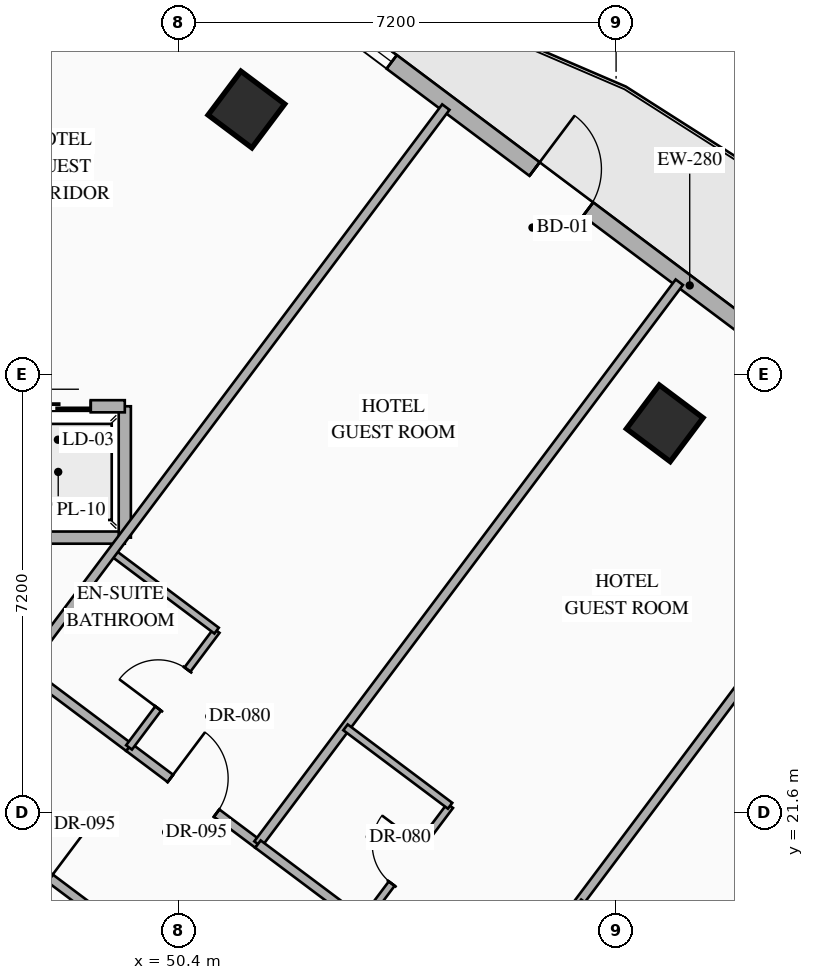
"""IFC4 building model, lengths in metres.
Left out: names, types, materials, properties, quantities, classifications, styles, units other than length and angle.
Written with IfcOpenShell. Run it as: python <this file> out.ifc"""

import sys

from ifc_helpers import new_model, si_unit, direction, frame, frame_2d, origin, origin_2d, place, context, subcontext, project, spatial, rectangle, hollow_rectangle, extrude, element, fill, save


model = new_model("IFC4")
c1 = context("Model", 3, precision=1e-05, world=origin(), true_north=direction((0.0, 1.0)))
c2 = subcontext(c1, "Body", "Model", "MODEL_VIEW")
j1 = project(units=[si_unit("LENGTHUNIT", "METRE"), si_unit("PLANEANGLEUNIT", "RADIAN")], contexts=[c1])
p1 = place(None, origin())
s1 = spatial("IfcSite", under=j1, at=p1, CompositionType="ELEMENT")
p2 = place(p1, origin())
s2 = spatial("IfcBuilding", under=s1, at=p2, CompositionType="ELEMENT")
p3 = place(p2, frame((0.0, 0.0, 88.0)))
s3 = spatial("IfcBuildingStorey", under=s2, at=p3, CompositionType="ELEMENT", Elevation=88.0)
for number, where, z_axis, x_axis in (
    (1, (51.52, 33.16, 0.0), (0.0, 0.0, 1.0), (0.8, -0.6, 0.0)),
    (2, (58.4, 28.0, 0.0), (0.0, 0.0, 1.0), (0.8, -0.6, 0.0)),
):
    element("IfcColumn", number, at=place(p3, frame(where, z_axis=z_axis, x_axis=x_axis)), inside=s3, PredefinedType="COLUMN", context=c2, shape_type="SweptSolid", body=[
        extrude(hollow_rectangle(XDim=0.9, YDim=0.9, WallThickness=0.036, at=origin_2d()), origin(), (0.0, 0.0, 1.0), 3.35),
    ])
p4 = place(p3, frame((44.86, 40.73, 0.0), z_axis=(0.0, 0.0, 1.0), x_axis=(0.800006902154, -0.599990797017, 0.0)))
e3 = element("IfcWall", 3, at=p4, inside=s3, PredefinedType="STANDARD", context=c2, shape_type="SweptSolid", body=[
    extrude(rectangle(XDim=29.712, YDim=0.28, at=frame_2d((14.856, 0.0))), origin(), (0.0, 0.0, 1.0), 3.05),
])
p5 = place(p4, frame((14.249, 0.0, 0.0)))
e4 = element("IfcOpeningElement", 4, at=p5, cuts=e3, PredefinedType="OPENING", context=c2, shape_type="SweptSolid", body=[
    extrude(rectangle(XDim=1.1, YDim=2.2, at=frame_2d((0.55, 1.1))), frame((0.0, 0.15, 0.0), z_axis=(0.0, -1.0, 0.0), x_axis=(1.0, 0.0, 0.0)), (0.0, 0.0, 1.0), 0.3),
])
p6 = place(p4, frame((1.612, 0.0, 0.85)))
e5 = element("IfcOpeningElement", 5, at=p6, cuts=e3, PredefinedType="OPENING", context=c2, shape_type="SweptSolid", body=[
    extrude(rectangle(XDim=1.4, YDim=1.8, at=frame_2d((0.7, 0.9))), frame((0.0, 0.15, 0.0), z_axis=(0.0, -1.0, 0.0), x_axis=(1.0, 0.0, 0.0)), (0.0, 0.0, 1.0), 0.3),
])
p7 = place(p4, frame((5.667, 0.0, 0.85)))
e6 = element("IfcOpeningElement", 6, at=p7, cuts=e3, PredefinedType="OPENING", context=c2, shape_type="SweptSolid", body=[
    extrude(rectangle(XDim=1.4, YDim=1.8, at=frame_2d((0.7, 0.9))), frame((0.0, 0.15, 0.0), z_axis=(0.0, -1.0, 0.0), x_axis=(1.0, 0.0, 0.0)), (0.0, 0.0, 1.0), 0.3),
])
p8 = place(p4, frame((9.912, 0.0, 0.85)))
e7 = element("IfcOpeningElement", 7, at=p8, cuts=e3, PredefinedType="OPENING", context=c2, shape_type="SweptSolid", body=[
    extrude(rectangle(XDim=1.4, YDim=1.8, at=frame_2d((0.7, 0.9))), frame((0.0, 0.15, 0.0), z_axis=(0.0, -1.0, 0.0), x_axis=(1.0, 0.0, 0.0)), (0.0, 0.0, 1.0), 0.3),
])
p9 = place(p4, frame((19.528, 0.0, 0.85)))
e8 = element("IfcOpeningElement", 8, at=p9, cuts=e3, PredefinedType="OPENING", context=c2, shape_type="SweptSolid", body=[
    extrude(rectangle(XDim=1.4, YDim=1.8, at=frame_2d((0.7, 0.9))), frame((0.0, 0.15, 0.0), z_axis=(0.0, -1.0, 0.0), x_axis=(1.0, 0.0, 0.0)), (0.0, 0.0, 1.0), 0.3),
])
p10 = place(p4, frame((23.451, 0.0, 0.85)))
e9 = element("IfcOpeningElement", 9, at=p10, cuts=e3, PredefinedType="OPENING", context=c2, shape_type="SweptSolid", body=[
    extrude(rectangle(XDim=1.4, YDim=1.8, at=frame_2d((0.7, 0.9))), frame((0.0, 0.15, 0.0), z_axis=(0.0, -1.0, 0.0), x_axis=(1.0, 0.0, 0.0)), (0.0, 0.0, 1.0), 0.3),
])
p11 = place(p4, frame((27.852, 0.0, 0.85)))
e10 = element("IfcOpeningElement", 10, at=p11, cuts=e3, PredefinedType="OPENING", context=c2, shape_type="SweptSolid", body=[
    extrude(rectangle(XDim=1.4, YDim=1.8, at=frame_2d((0.7, 0.9))), frame((0.0, 0.15, 0.0), z_axis=(0.0, -1.0, 0.0), x_axis=(1.0, 0.0, 0.0)), (0.0, 0.0, 1.0), 0.3),
])
p12 = place(p3, frame((45.12, 26.12, 0.0), z_axis=(0.0, 0.0, 1.0), x_axis=(1.0, 0.0, 0.0)))
e11 = element("IfcWall", 11, at=p12, inside=s3, PredefinedType="STANDARD", context=c2, shape_type="SweptSolid", body=[
    extrude(rectangle(XDim=4.4, YDim=0.2, at=frame_2d((2.2, 0.0))), origin(), (0.0, 0.0, 1.0), 3.05),
])
p13 = place(p3, frame((49.52, 26.12, 0.0), z_axis=(0.0, 0.0, 1.0), x_axis=(0.0, 1.0, 0.0)))
e12 = element("IfcWall", 12, at=p13, inside=s3, PredefinedType="STANDARD", context=c2, shape_type="SweptSolid", body=[
    extrude(rectangle(XDim=2.16, YDim=0.2, at=frame_2d((1.08, 0.0))), origin(), (0.0, 0.0, 1.0), 3.05),
])
p14 = place(p3, frame((45.12, 28.28, 0.0), z_axis=(0.0, 0.0, 1.0), x_axis=(1.0, 0.0, 0.0)))
e13 = element("IfcWall", 13, at=p14, inside=s3, PredefinedType="STANDARD", context=c2, shape_type="SweptSolid", body=[
    extrude(rectangle(XDim=4.4, YDim=0.2, at=frame_2d((2.2, 0.0))), origin(), (0.0, 0.0, 1.0), 3.05),
])
p15 = place(p14, frame((0.56, 0.0, 0.0)))
e14 = element("IfcOpeningElement", 14, at=p15, cuts=e13, PredefinedType="OPENING", context=c2, shape_type="SweptSolid", body=[
    extrude(rectangle(XDim=1.08, YDim=2.15, at=frame_2d((0.54, 1.075))), frame((0.0, 0.11, 0.0), z_axis=(0.0, -1.0, 0.0), x_axis=(1.0, 0.0, 0.0)), (0.0, 0.0, 1.0), 0.22),
])
p16 = place(p14, frame((2.76, 0.0, 0.0)))
e15 = element("IfcOpeningElement", 15, at=p16, cuts=e13, PredefinedType="OPENING", context=c2, shape_type="SweptSolid", body=[
    extrude(rectangle(XDim=1.08, YDim=2.15, at=frame_2d((0.54, 1.075))), frame((0.0, 0.11, 0.0), z_axis=(0.0, -1.0, 0.0), x_axis=(1.0, 0.0, 0.0)), (0.0, 0.0, 1.0), 0.22),
])
p17 = place(p3, frame((47.87, 23.96, 0.0), z_axis=(0.0, 0.0, 1.0), x_axis=(0.79998637334, -0.60001816845, 0.0)))
e16 = element("IfcWall", 16, at=p17, inside=s3, PredefinedType="PARTITIONING", context=c2, shape_type="SweptSolid", body=[
    extrude(rectangle(XDim=2.15, YDim=0.15, at=frame_2d((1.075, 0.0))), origin(), (0.0, 0.0, 1.0), 2.695),
])
p18 = place(p3, frame((49.59, 22.67, 0.0), z_axis=(0.0, 0.0, 1.0), x_axis=(0.800011056104, -0.599985258246, 0.0)))
e17 = element("IfcWall", 17, at=p18, inside=s3, PredefinedType="PARTITIONING", context=c2, shape_type="SweptSolid", body=[
    extrude(rectangle(XDim=2.65, YDim=0.15, at=frame_2d((1.325, 0.0))), origin(), (0.0, 0.0, 1.0), 2.695),
])
p19 = place(p18, frame((0.85, 0.0, 0.0)))
e18 = element("IfcOpeningElement", 18, at=p19, cuts=e17, PredefinedType="OPENING", context=c2, shape_type="SweptSolid", body=[
    extrude(rectangle(XDim=0.95, YDim=2.15, at=frame_2d((0.475, 1.075))), frame((0.0, 0.085, 0.0), z_axis=(0.0, -1.0, 0.0), x_axis=(1.0, 0.0, 0.0)), (0.0, 0.0, 1.0), 0.17),
])
p20 = place(p3, frame((49.59, 22.67, 0.0), z_axis=(0.0, 0.0, 1.0), x_axis=(0.599951172744, 0.800036618114, 0.0)))
e19 = element("IfcWall", 19, at=p20, inside=s3, PredefinedType="PARTITIONING", context=c2, shape_type="SweptSolid", body=[
    extrude(rectangle(XDim=2.4, YDim=0.12, at=frame_2d((1.2, 0.0))), origin(), (0.0, 0.0, 1.0), 3.05),
])
p21 = place(p20, frame((0.8, 0.0, 0.0)))
e20 = element("IfcOpeningElement", 20, at=p21, cuts=e19, PredefinedType="OPENING", context=c2, shape_type="SweptSolid", body=[
    extrude(rectangle(XDim=0.8, YDim=2.06, at=frame_2d((0.4, 1.03))), frame((0.0, 0.07, 0.0), z_axis=(0.0, -1.0, 0.0), x_axis=(1.0, 0.0, 0.0)), (0.0, 0.0, 1.0), 0.14),
])
p22 = place(p3, frame((49.31, 25.88, 0.0), z_axis=(0.0, 0.0, 1.0), x_axis=(0.800040880289, -0.59994548908, 0.0)))
e21 = element("IfcWall", 21, at=p22, inside=s3, PredefinedType="PARTITIONING", context=c2, shape_type="SweptSolid", body=[
    extrude(rectangle(XDim=2.15, YDim=0.12, at=frame_2d((1.075, 0.0))), origin(), (0.0, 0.0, 1.0), 3.05),
])
for number, where, z_axis, x_axis in (
    (22, (47.87, 23.96, 0.0), (0.0, 0.0, 1.0), (0.6, 0.8, 0.0)),
    (23, (51.71, 21.08, 0.0), (0.0, 0.0, 1.0), (0.6, 0.8, 0.0)),
):
    element("IfcWall", number, at=place(p3, frame(where, z_axis=z_axis, x_axis=x_axis)), inside=s3, PredefinedType="PARTITIONING", context=c2, shape_type="SweptSolid", body=[
        extrude(rectangle(XDim=11.55, YDim=0.15, at=frame_2d((5.775, 0.0))), origin(), (0.0, 0.0, 1.0), 3.05),
    ])
p23 = place(p3, frame((51.71, 21.08, 0.0), z_axis=(0.0, 0.0, 1.0), x_axis=(0.79998637334, -0.60001816845, 0.0)))
e24 = element("IfcWall", 24, at=p23, inside=s3, PredefinedType="PARTITIONING", context=c2, shape_type="SweptSolid", body=[
    extrude(rectangle(XDim=2.15, YDim=0.15, at=frame_2d((1.075, 0.0))), origin(), (0.0, 0.0, 1.0), 2.695),
])
p24 = place(p3, frame((53.43, 19.79, 0.0), z_axis=(0.0, 0.0, 1.0), x_axis=(0.600065100855, 0.79995117022, 0.0)))
e25 = element("IfcWall", 25, at=p24, inside=s3, PredefinedType="PARTITIONING", context=c2, shape_type="SweptSolid", body=[
    extrude(rectangle(XDim=2.4, YDim=0.12, at=frame_2d((1.2, 0.0))), origin(), (0.0, 0.0, 1.0), 3.05),
])
p25 = place(p24, frame((0.8, 0.0, 0.0)))
e26 = element("IfcOpeningElement", 26, at=p25, cuts=e25, PredefinedType="OPENING", context=c2, shape_type="SweptSolid", body=[
    extrude(rectangle(XDim=0.8, YDim=2.06, at=frame_2d((0.4, 1.03))), frame((0.0, 0.07, 0.0), z_axis=(0.0, -1.0, 0.0), x_axis=(1.0, 0.0, 0.0)), (0.0, 0.0, 1.0), 0.14),
])
p26 = place(p3, frame((53.15, 23.0, 0.0), z_axis=(0.0, 0.0, 1.0), x_axis=(0.800027249606, -0.599963665473, 0.0)))
e27 = element("IfcWall", 27, at=p26, inside=s3, PredefinedType="PARTITIONING", context=c2, shape_type="SweptSolid", body=[
    extrude(rectangle(XDim=2.15, YDim=0.12, at=frame_2d((1.075, 0.0))), origin(), (0.0, 0.0, 1.0), 3.05),
])
p27 = place(p3, frame((55.55, 18.2, 0.0), z_axis=(0.0, 0.0, 1.0), x_axis=(0.599996617946, 0.80000253653, 0.0)))
e28 = element("IfcWall", 28, at=p27, inside=s3, PredefinedType="PARTITIONING", context=c2, shape_type="SweptSolid", body=[
    extrude(rectangle(XDim=11.55, YDim=0.15, at=frame_2d((5.775, 0.0))), origin(), (0.0, 0.0, 1.0), 3.05),
])
p28 = place(p3, frame((56.99, 20.12, 0.0), z_axis=(0.0, 0.0, 1.0), x_axis=(0.79998637334, -0.60001816845, 0.0)))
e29 = element("IfcWall", 29, at=p28, inside=s3, PredefinedType="PARTITIONING", context=c2, shape_type="SweptSolid", body=[
    extrude(rectangle(XDim=2.15, YDim=0.12, at=frame_2d((1.075, 0.0))), origin(), (0.0, 0.0, 1.0), 3.05),
])
p29 = place(p3, frame((59.55, 15.2, 0.0), z_axis=(0.0, 0.0, 1.0), x_axis=(0.599996617946, 0.80000253653, 0.0)))
e30 = element("IfcWall", 30, at=p29, inside=s3, PredefinedType="PARTITIONING", context=c2, shape_type="SweptSolid", body=[
    extrude(rectangle(XDim=11.55, YDim=0.15, at=frame_2d((5.775, 0.0))), origin(), (0.0, 0.0, 1.0), 3.05),
])
p30 = place(p3, frame((46.37, 21.96, 0.0), z_axis=(0.0, 0.0, 1.0), x_axis=(0.799977170108, -0.600030438649, 0.0)))
e31 = element("IfcWall", 31, at=p30, inside=s3, PredefinedType="PARTITIONING", context=c2, shape_type="SweptSolid", body=[
    extrude(rectangle(XDim=3.85, YDim=0.15, at=frame_2d((1.925, 0.0))), origin(), (0.0, 0.0, 1.0), 2.345),
])
p31 = place(p30, frame((1.45, 0.0, 0.0)))
e32 = element("IfcOpeningElement", 32, at=p31, cuts=e31, PredefinedType="OPENING", context=c2, shape_type="SweptSolid", body=[
    extrude(rectangle(XDim=0.95, YDim=2.15, at=frame_2d((0.475, 1.075))), frame((0.0, 0.085, 0.0), z_axis=(0.0, -1.0, 0.0), x_axis=(1.0, 0.0, 0.0)), (0.0, 0.0, 1.0), 0.17),
])
p32 = place(p5, origin())
e33 = element("IfcDoor", 33, at=p32, inside=s3, OperationType="SINGLE_SWING_LEFT", PredefinedType="DOOR", context=c2, shape_type="SweptSolid", body=[
    extrude(rectangle(XDim=1.1, YDim=2.2, at=frame_2d((0.55, 1.1))), frame((0.0, 0.025, 0.0), z_axis=(0.0, -1.0, 0.0), x_axis=(1.0, 0.0, 0.0)), (0.0, 0.0, 1.0), 0.05),
])
fill(e4, e33)
p33 = place(p8, origin())
e34 = element("IfcWindow", 34, at=p33, inside=s3, PartitioningType="SINGLE_PANEL", PredefinedType="WINDOW", context=c2, shape_type="SweptSolid", body=[
    extrude(rectangle(XDim=1.4, YDim=1.8, at=frame_2d((0.7, 0.9))), frame((0.0, 0.03, 0.0), z_axis=(0.0, -1.0, 0.0), x_axis=(1.0, 0.0, 0.0)), (0.0, 0.0, 1.0), 0.06),
])
fill(e7, e34)
p34 = place(p16, origin())
e35 = element("IfcDoor", 35, at=p34, inside=s3, OperationType="SLIDING_TO_LEFT", PredefinedType="USERDEFINED", context=c2, shape_type="SweptSolid", body=[
    extrude(rectangle(XDim=1.08, YDim=2.15, at=frame_2d((0.54, 1.075))), frame((0.0, 0.025, 0.0), z_axis=(0.0, -1.0, 0.0), x_axis=(1.0, 0.0, 0.0)), (0.0, 0.0, 1.0), 0.05),
])
fill(e15, e35)
p35 = place(p19, origin())
e36 = element("IfcDoor", 36, at=p35, inside=s3, OperationType="SINGLE_SWING_LEFT", PredefinedType="DOOR", context=c2, shape_type="SweptSolid", body=[
    extrude(rectangle(XDim=0.95, YDim=2.15, at=frame_2d((0.475, 1.075))), frame((0.0, 0.025, 0.0), z_axis=(0.0, -1.0, 0.0), x_axis=(1.0, 0.0, 0.0)), (0.0, 0.0, 1.0), 0.05),
])
fill(e18, e36)
p36 = place(p21, origin())
e37 = element("IfcDoor", 37, at=p36, inside=s3, OperationType="SINGLE_SWING_LEFT", PredefinedType="DOOR", context=c2, shape_type="SweptSolid", body=[
    extrude(rectangle(XDim=0.8, YDim=2.06, at=frame_2d((0.4, 1.03))), frame((0.0, 0.025, 0.0), z_axis=(0.0, -1.0, 0.0), x_axis=(1.0, 0.0, 0.0)), (0.0, 0.0, 1.0), 0.05),
])
fill(e20, e37)
p37 = place(p25, origin())
e38 = element("IfcDoor", 38, at=p37, inside=s3, OperationType="SINGLE_SWING_RIGHT", PredefinedType="DOOR", context=c2, shape_type="SweptSolid", body=[
    extrude(rectangle(XDim=0.8, YDim=2.06, at=frame_2d((0.4, 1.03))), frame((0.0, 0.025, 0.0), z_axis=(0.0, -1.0, 0.0), x_axis=(1.0, 0.0, 0.0)), (0.0, 0.0, 1.0), 0.05),
])
fill(e26, e38)
save(model, sys.argv[1])
